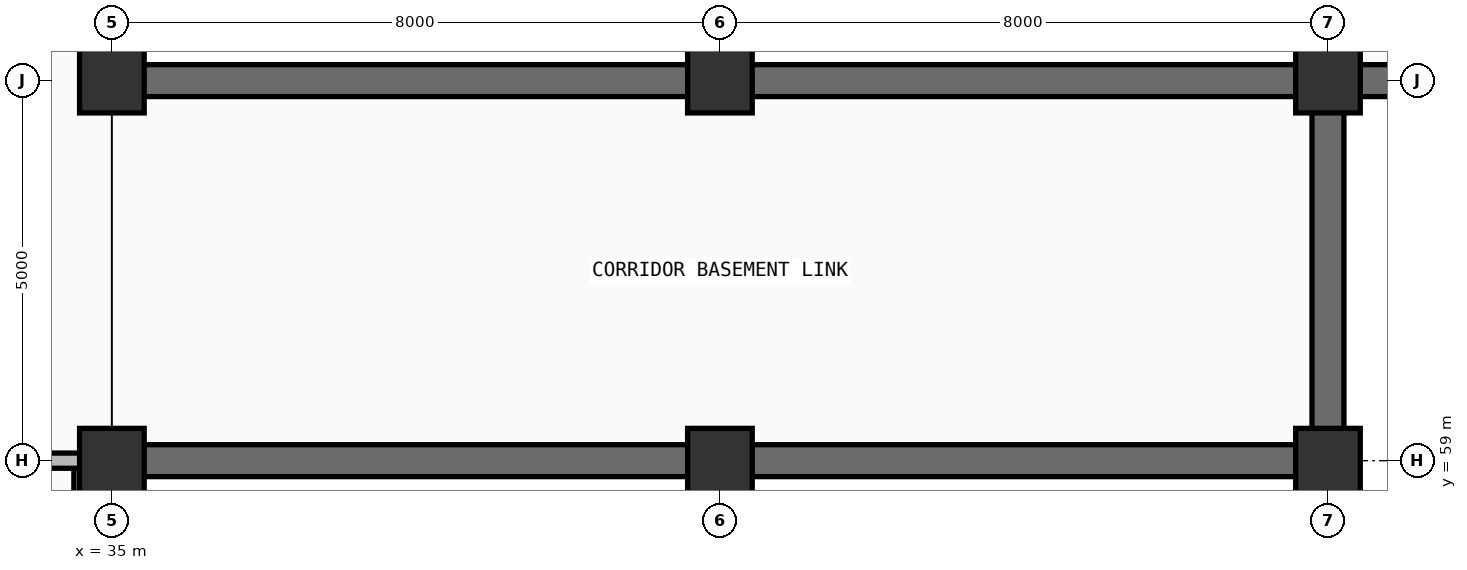
"""IFC4 building model, lengths in metres.
Left out: names, types, materials, properties, quantities, classifications, styles, units other than length and angle.
Written with IfcOpenShell. Run it as: python <this file> out.ifc"""

import sys

from ifc_helpers import new_model, si_unit, direction, frame, frame_2d, origin, origin_2d, place, context, subcontext, project, spatial, rectangle, extrude, element, save


model = new_model("IFC4")
c1 = context("Model", 3, precision=1e-05, world=origin(), true_north=direction((0.0, 1.0)))
c2 = subcontext(c1, "Body", "Model", "MODEL_VIEW")
j1 = project(units=[si_unit("LENGTHUNIT", "METRE"), si_unit("PLANEANGLEUNIT", "RADIAN")], contexts=[c1])
p1 = place(None, origin())
s1 = spatial("IfcSite", under=j1, at=p1, CompositionType="ELEMENT")
p2 = place(p1, origin())
s2 = spatial("IfcBuilding", under=s1, at=p2, CompositionType="ELEMENT")
p3 = place(p2, frame((0.0, 0.0, -4.5)))
s3 = spatial("IfcBuildingStorey", under=s2, at=p3, CompositionType="ELEMENT", Elevation=-4.5)
for number, where, z_axis, x_axis in (
    (1, (35.0, 59.0, -0.6), (0.0, 0.0, 1.0), (1.0, 0.0, 0.0)),
    (2, (35.0, 64.0, -0.6), (0.0, 0.0, 1.0), (1.0, 0.0, 0.0)),
    (3, (43.0, 59.0, -0.6), (0.0, 0.0, 1.0), (1.0, 0.0, 0.0)),
    (4, (43.0, 64.0, -0.6), (0.0, 0.0, 1.0), (1.0, 0.0, 0.0)),
    (5, (51.0, 59.0, -0.6), (0.0, 0.0, 1.0), (1.0, 0.0, 0.0)),
    (6, (51.0, 64.0, -0.6), (0.0, 0.0, 1.0), (1.0, 0.0, 0.0)),
):
    element("IfcColumn", number, at=place(p3, frame(where, z_axis=z_axis, x_axis=x_axis)), inside=s3, PredefinedType="COLUMN", context=c2, shape_type="SweptSolid", body=[
        extrude(rectangle(XDim=0.85, YDim=0.85, at=origin_2d()), origin(), (0.0, 0.0, 1.0), 5.1),
    ])
for number, where, z_axis, x_axis in (
    (7, (35.0, 72.0, 0.0), (0.0, 0.0, 1.0), (0.0, -1.0, 0.0)),
    (8, (35.0, 64.0, 0.0), (0.0, 0.0, 1.0), (1.0, 0.0, 0.0)),
    (9, (43.0, 64.0, 0.0), (0.0, 0.0, 1.0), (1.0, 0.0, 0.0)),
):
    element("IfcWall", number, at=place(p3, frame(where, z_axis=z_axis, x_axis=x_axis)), inside=s3, PredefinedType="USERDEFINED", context=c2, shape_type="SweptSolid", body=[
        extrude(rectangle(XDim=8.0, YDim=0.42, at=frame_2d((4.0, 0.0))), origin(), (0.0, 0.0, 1.0), 4.5),
    ])
p4 = place(p3, frame((51.0, 64.0, 0.0), z_axis=(0.0, 0.0, 1.0), x_axis=(0.0, -1.0, 0.0)))
e10 = element("IfcWall", 10, at=p4, inside=s3, PredefinedType="USERDEFINED", context=c2, shape_type="SweptSolid", body=[
    extrude(rectangle(XDim=5.0, YDim=0.42, at=frame_2d((2.5, 0.0))), origin(), (0.0, 0.0, 1.0), 4.5),
])
for number, where, z_axis, x_axis in (
    (11, (51.0, 59.0, 0.0), (0.0, 0.0, 1.0), (-1.0, 0.0, 0.0)),
    (12, (43.0, 59.0, 0.0), (0.0, 0.0, 1.0), (-1.0, 0.0, 0.0)),
    (13, (35.0, 59.0, 0.0), (0.0, 0.0, 1.0), (0.0, -1.0, 0.0)),
    (14, (59.0, 64.0, 0.0), (0.0, 0.0, 1.0), (-1.0, 0.0, 0.0)),
    (15, (51.0, 64.0, 0.0), (0.0, 0.0, 1.0), (0.0, 1.0, 0.0)),
):
    element("IfcWall", number, at=place(p3, frame(where, z_axis=z_axis, x_axis=x_axis)), inside=s3, PredefinedType="USERDEFINED", context=c2, shape_type="SweptSolid", body=[
        extrude(rectangle(XDim=8.0, YDim=0.42, at=frame_2d((4.0, 0.0))), origin(), (0.0, 0.0, 1.0), 4.5),
    ])
p5 = place(p3, frame((34.6, 40.4, 0.0), z_axis=(0.0, 0.0, 1.0), x_axis=(0.0, 1.0, 0.0)))
e16 = element("IfcWall", 16, at=p5, inside=s3, PredefinedType="PARTITIONING", context=c2, shape_type="SweptSolid", body=[
    extrude(rectangle(XDim=18.6, YDim=0.2, at=frame_2d((9.3, 0.0))), origin(), (0.0, 0.0, 1.0), 3.505),
])
p6 = place(p3, frame((23.0, 59.0, 0.0), z_axis=(0.0, 0.0, 1.0), x_axis=(1.0, 0.0, 0.0)))
e17 = element("IfcWall", 17, at=p6, inside=s3, PredefinedType="PARTITIONING", context=c2, shape_type="SweptSolid", body=[
    extrude(rectangle(XDim=11.6, YDim=0.2, at=frame_2d((5.8, 0.0))), origin(), (0.0, 0.0, 1.0), 3.435),
])
save(model, sys.argv[1])
